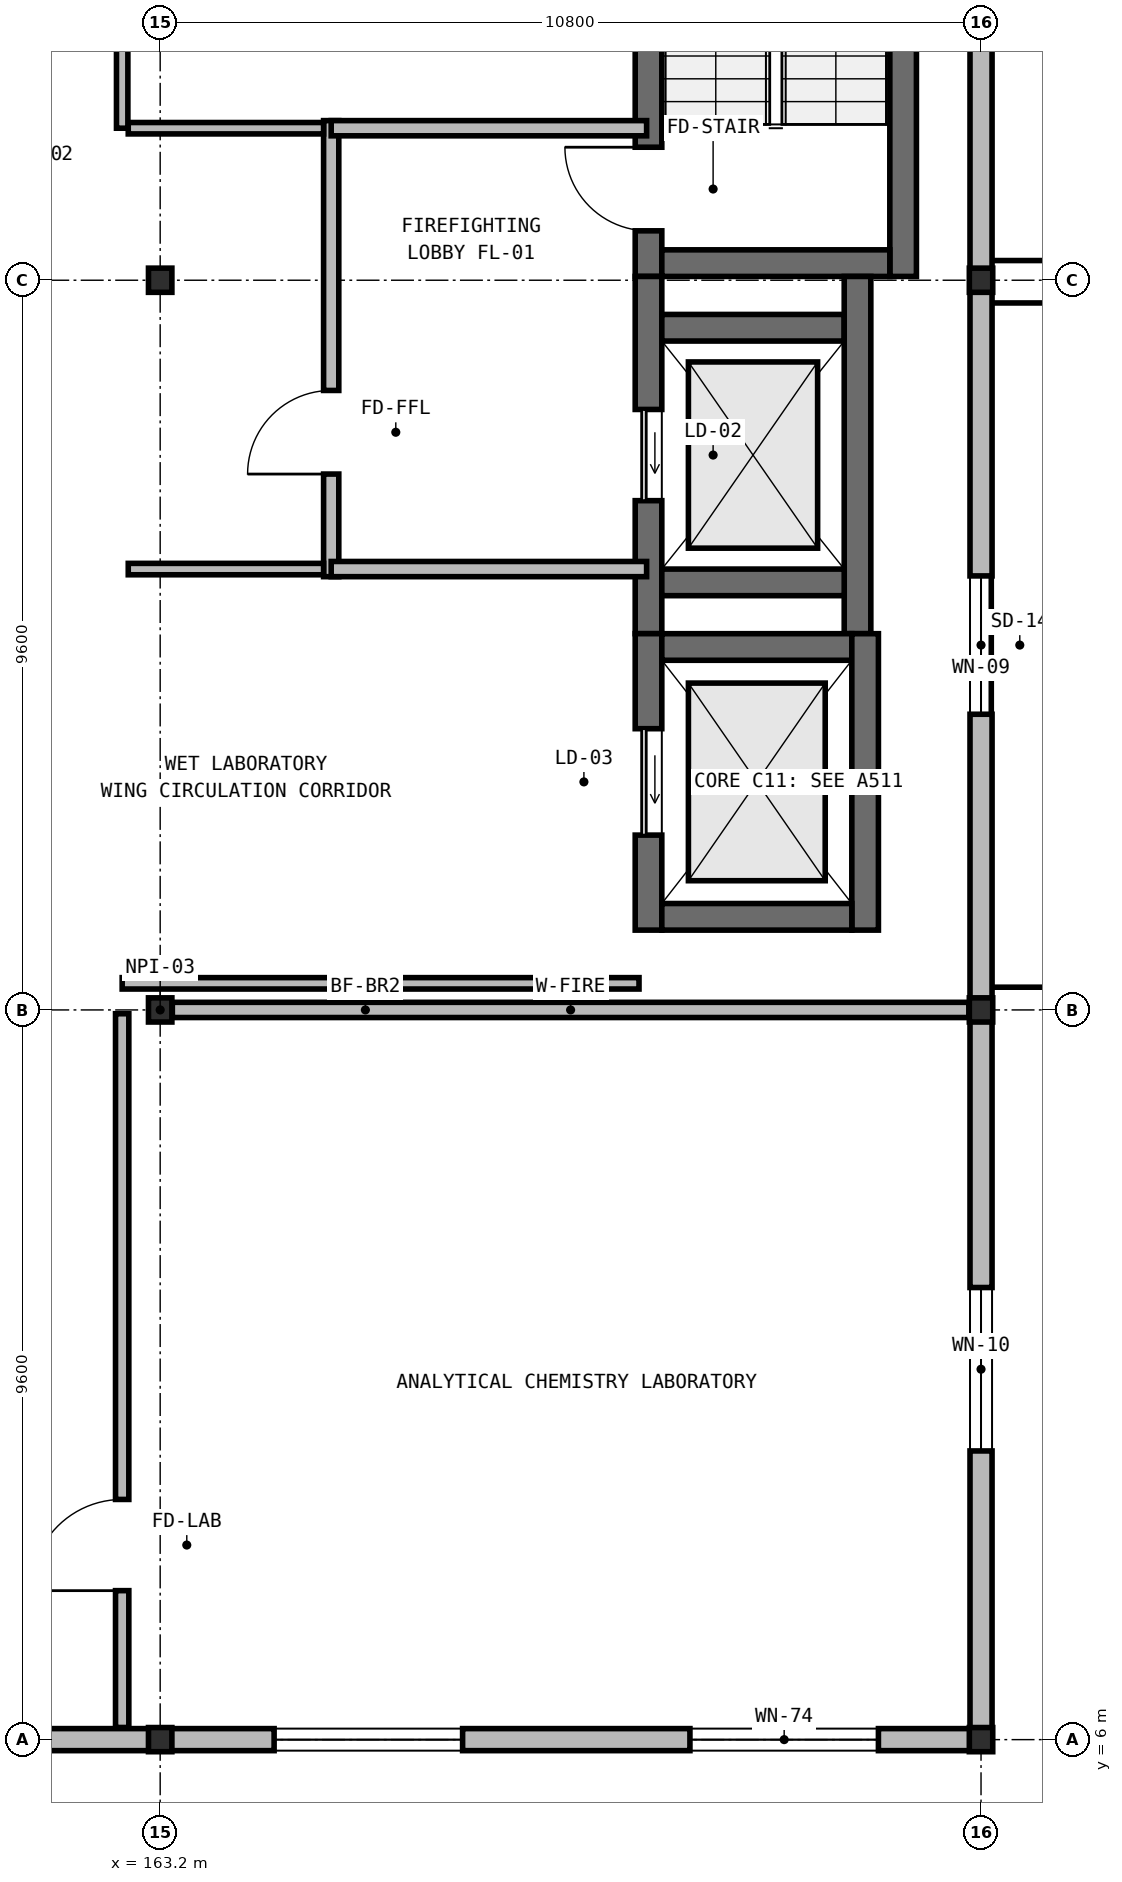
"""IFC4 building model, lengths in metres.
Left out: names, types, materials, properties, quantities, classifications, styles, units other than length and angle.
Written with IfcOpenShell. Run it as: python <this file> out.ifc"""

import sys

from ifc_helpers import new_model, si_unit, direction, frame, frame_2d, origin, origin_2d, place, context, subcontext, project, spatial, rectangle, i_section, extrude, element, fill, save


model = new_model("IFC4")
c1 = context("Model", 3, precision=1e-05, world=origin(), true_north=direction((0.0, 1.0)))
c2 = subcontext(c1, "Body", "Model", "MODEL_VIEW")
j1 = project(units=[si_unit("LENGTHUNIT", "METRE"), si_unit("PLANEANGLEUNIT", "RADIAN")], contexts=[c1])
p1 = place(None, origin())
s1 = spatial("IfcSite", under=j1, at=p1, CompositionType="ELEMENT")
p2 = place(p1, origin())
s2 = spatial("IfcBuilding", under=s1, at=p2, CompositionType="ELEMENT")
p3 = place(p2, frame((0.0, 0.0, 41.65)))
s3 = spatial("IfcBuildingStorey", under=s2, at=p3, CompositionType="ELEMENT", Elevation=41.65)
p4 = place(p3, frame((169.625, 25.25, 0.0), z_axis=(0.0, 0.0, 1.0), x_axis=(0.0, 1.0, 0.0)))
e1 = element("IfcWall", 1, at=p4, inside=s3, PredefinedType="SHEAR", context=c2, shape_type="SweptSolid", body=[
    extrude(rectangle(XDim=8.2, YDim=0.35, at=frame_2d((4.1, 0.0))), origin(), (0.0, 0.0, 1.0), 4.55),
])
p5 = place(p4, frame((0.6, 0.0, 0.0)))
e2 = element("IfcOpeningElement", 2, at=p5, cuts=e1, PredefinedType="OPENING", context=c2, shape_type="SweptSolid", body=[
    extrude(rectangle(XDim=1.1, YDim=2.15, at=frame_2d((0.55, 1.075))), frame((0.0, 0.185, 0.0), z_axis=(0.0, -1.0, 0.0), x_axis=(1.0, 0.0, 0.0)), (0.0, 0.0, 1.0), 0.37),
])
p6 = place(p3, frame((172.975, 33.45, 0.0), z_axis=(0.0, 0.0, 1.0), x_axis=(0.0, -1.0, 0.0)))
e3 = element("IfcWall", 3, at=p6, inside=s3, PredefinedType="SHEAR", context=c2, shape_type="SweptSolid", body=[
    extrude(rectangle(XDim=8.2, YDim=0.35, at=frame_2d((4.1, 0.0))), origin(), (0.0, 0.0, 1.0), 4.55),
])
p7 = place(p3, frame((172.8, 25.425, 0.0), z_axis=(0.0, 0.0, 1.0), x_axis=(-1.0, 0.0, 0.0)))
e4 = element("IfcWall", 4, at=p7, inside=s3, PredefinedType="SHEAR", context=c2, shape_type="SweptSolid", body=[
    extrude(rectangle(XDim=3.0, YDim=0.35, at=frame_2d((1.5, 0.0))), origin(), (0.0, 0.0, 1.0), 4.55),
])
p8 = place(p3, frame((169.625, 20.55, 0.0), z_axis=(0.0, 0.0, 1.0), x_axis=(0.0, 1.0, 0.0)))
e5 = element("IfcWall", 5, at=p8, inside=s3, PredefinedType="SHEAR", context=c2, shape_type="SweptSolid", body=[
    extrude(rectangle(XDim=4.7, YDim=0.35, at=frame_2d((2.35, 0.0))), origin(), (0.0, 0.0, 1.0), 4.55),
])
p9 = place(p8, frame((1.75, 0.0, 0.0)))
e6 = element("IfcOpeningElement", 6, at=p9, cuts=e5, PredefinedType="OPENING", context=c2, shape_type="SweptSolid", body=[
    extrude(rectangle(XDim=1.2, YDim=2.15, at=frame_2d((0.6, 1.075))), frame((0.0, 0.185, 0.0), z_axis=(0.0, -1.0, 0.0), x_axis=(1.0, 0.0, 0.0)), (0.0, 0.0, 1.0), 0.37),
])
p10 = place(p3, frame((169.8, 24.575, 0.0), z_axis=(0.0, 0.0, 1.0), x_axis=(1.0, 0.0, 0.0)))
e7 = element("IfcWall", 7, at=p10, inside=s3, PredefinedType="SHEAR", context=c2, shape_type="SweptSolid", body=[
    extrude(rectangle(XDim=2.4, YDim=0.35, at=frame_2d((1.2, 0.0))), origin(), (0.0, 0.0, 1.0), 4.55),
])
p11 = place(p3, frame((172.375, 25.25, 0.0), z_axis=(0.0, 0.0, 1.0), x_axis=(0.0, -1.0, 0.0)))
e8 = element("IfcWall", 8, at=p11, inside=s3, PredefinedType="SHEAR", context=c2, shape_type="SweptSolid", body=[
    extrude(rectangle(XDim=4.7, YDim=0.35, at=frame_2d((2.35, 0.0))), origin(), (0.0, 0.0, 1.0), 4.55),
])
p12 = place(p3, frame((172.2, 21.225, 0.0), z_axis=(0.0, 0.0, 1.0), x_axis=(-1.0, 0.0, 0.0)))
e9 = element("IfcWall", 9, at=p12, inside=s3, PredefinedType="SHEAR", context=c2, shape_type="SweptSolid", body=[
    extrude(rectangle(XDim=2.4, YDim=0.35, at=frame_2d((1.2, 0.0))), origin(), (0.0, 0.0, 1.0), 4.55),
])
p13 = place(p3, frame((169.625, 16.65, 0.0), z_axis=(0.0, 0.0, 1.0), x_axis=(0.0, 1.0, 0.0)))
e10 = element("IfcWall", 10, at=p13, inside=s3, PredefinedType="SHEAR", context=c2, shape_type="SweptSolid", body=[
    extrude(rectangle(XDim=3.9, YDim=0.35, at=frame_2d((1.95, 0.0))), origin(), (0.0, 0.0, 1.0), 4.55),
])
p14 = place(p13, frame((1.25, 0.0, 0.0)))
e11 = element("IfcOpeningElement", 11, at=p14, cuts=e10, PredefinedType="OPENING", context=c2, shape_type="SweptSolid", body=[
    extrude(rectangle(XDim=1.4, YDim=2.3, at=frame_2d((0.7, 1.15))), frame((0.0, 0.185, 0.0), z_axis=(0.0, -1.0, 0.0), x_axis=(1.0, 0.0, 0.0)), (0.0, 0.0, 1.0), 0.37),
])
p15 = place(p3, frame((169.8, 20.375, 0.0), z_axis=(0.0, 0.0, 1.0), x_axis=(1.0, 0.0, 0.0)))
e12 = element("IfcWall", 12, at=p15, inside=s3, PredefinedType="SHEAR", context=c2, shape_type="SweptSolid", body=[
    extrude(rectangle(XDim=2.5, YDim=0.35, at=frame_2d((1.25, 0.0))), origin(), (0.0, 0.0, 1.0), 4.55),
])
p16 = place(p3, frame((172.475, 20.55, 0.0), z_axis=(0.0, 0.0, 1.0), x_axis=(0.0, -1.0, 0.0)))
e13 = element("IfcWall", 13, at=p16, inside=s3, PredefinedType="SHEAR", context=c2, shape_type="SweptSolid", body=[
    extrude(rectangle(XDim=3.9, YDim=0.35, at=frame_2d((1.95, 0.0))), origin(), (0.0, 0.0, 1.0), 4.55),
])
p17 = place(p3, frame((172.3, 16.825, 0.0), z_axis=(0.0, 0.0, 1.0), x_axis=(-1.0, 0.0, 0.0)))
e14 = element("IfcWall", 14, at=p17, inside=s3, PredefinedType="SHEAR", context=c2, shape_type="SweptSolid", body=[
    extrude(rectangle(XDim=2.5, YDim=0.35, at=frame_2d((1.25, 0.0))), origin(), (0.0, 0.0, 1.0), 4.55),
])
for number, where, z_axis, x_axis in (
    (15, (163.2, 6.0, 0.0), (0.0, 0.0, 1.0), (1.0, 0.0, 0.0)),
    (16, (163.2, 15.6, 0.0), (0.0, 0.0, 1.0), (1.0, 0.0, 0.0)),
    (17, (163.2, 25.2, 0.0), (0.0, 0.0, 1.0), (1.0, 0.0, 0.0)),
    (18, (174.0, 6.0, 0.0), (0.0, 0.0, 1.0), (1.0, 0.0, 0.0)),
    (19, (174.0, 15.6, 0.0), (0.0, 0.0, 1.0), (1.0, 0.0, 0.0)),
    (20, (174.0, 25.2, 0.0), (0.0, 0.0, 1.0), (1.0, 0.0, 0.0)),
):
    element("IfcColumn", number, at=place(p3, frame(where, z_axis=z_axis, x_axis=x_axis)), inside=s3, PredefinedType="COLUMN", context=c2, shape_type="SweptSolid", body=[
        extrude(i_section(OverallWidth=0.308, OverallDepth=0.318, WebThickness=0.013, FlangeThickness=0.021, at=origin_2d()), origin(), (0.0, 0.0, 1.0), 4.55),
    ])
p18 = place(p3, frame((174.0, 34.796, 0.0), z_axis=(0.0, 0.0, 1.0), x_axis=(0.0, -1.0, 0.0)))
e21 = element("IfcWall", 21, at=p18, inside=s3, PredefinedType="SOLIDWALL", context=c2, shape_type="SweptSolid", body=[
    extrude(rectangle(XDim=9.592, YDim=0.29, at=frame_2d((4.796, 0.0))), origin(), (0.0, 0.0, 1.0), 3.822),
])
p19 = place(p18, frame((4.051, 0.0, 0.95)))
e22 = element("IfcOpeningElement", 22, at=p19, cuts=e21, PredefinedType="OPENING", context=c2, shape_type="SweptSolid", body=[
    extrude(rectangle(XDim=1.49, YDim=1.48, at=frame_2d((0.745, 0.74))), frame((0.0, 0.155, 0.0), z_axis=(0.0, -1.0, 0.0), x_axis=(1.0, 0.0, 0.0)), (0.0, 0.0, 1.0), 0.31),
])
p20 = place(p3, frame((174.0, 25.196, 0.0), z_axis=(0.0, 0.0, 1.0), x_axis=(0.0, -1.0, 0.0)))
e23 = element("IfcWall", 23, at=p20, inside=s3, PredefinedType="SOLIDWALL", context=c2, shape_type="SweptSolid", body=[
    extrude(rectangle(XDim=9.592, YDim=0.29, at=frame_2d((4.796, 0.0))), origin(), (0.0, 0.0, 1.0), 3.822),
])
p21 = place(p20, frame((3.886, 0.0, 0.95)))
e24 = element("IfcOpeningElement", 24, at=p21, cuts=e23, PredefinedType="OPENING", context=c2, shape_type="SweptSolid", body=[
    extrude(rectangle(XDim=1.82, YDim=1.4, at=frame_2d((0.91, 0.7))), frame((0.0, 0.155, 0.0), z_axis=(0.0, -1.0, 0.0), x_axis=(1.0, 0.0, 0.0)), (0.0, 0.0, 1.0), 0.31),
])
p22 = place(p3, frame((174.0, 15.596, 0.0), z_axis=(0.0, 0.0, 1.0), x_axis=(0.0, -1.0, 0.0)))
e25 = element("IfcWall", 25, at=p22, inside=s3, PredefinedType="SOLIDWALL", context=c2, shape_type="SweptSolid", body=[
    extrude(rectangle(XDim=9.447, YDim=0.29, at=frame_2d((4.724, 0.0))), origin(), (0.0, 0.0, 1.0), 3.864),
])
p23 = place(p22, frame((3.648, 0.0, 0.95)))
e26 = element("IfcOpeningElement", 26, at=p23, cuts=e25, PredefinedType="OPENING", context=c2, shape_type="SweptSolid", body=[
    extrude(rectangle(XDim=2.15, YDim=1.8, at=frame_2d((1.075, 0.9))), frame((0.0, 0.155, 0.0), z_axis=(0.0, -1.0, 0.0), x_axis=(1.0, 0.0, 0.0)), (0.0, 0.0, 1.0), 0.31),
])
p24 = place(p3, frame((174.145, 6.0, 0.0), z_axis=(0.0, 0.0, 1.0), x_axis=(-1.0, 0.0, 0.0)))
e27 = element("IfcWall", 27, at=p24, inside=s3, PredefinedType="SOLIDWALL", context=c2, shape_type="SweptSolid", body=[
    extrude(rectangle(XDim=10.941, YDim=0.29, at=frame_2d((5.47, 0.0))), origin(), (0.0, 0.0, 1.0), 3.795),
])
p25 = place(p24, frame((1.495, 0.0, 0.95)))
e28 = element("IfcOpeningElement", 28, at=p25, cuts=e27, PredefinedType="OPENING", context=c2, shape_type="SweptSolid", body=[
    extrude(rectangle(XDim=2.48, YDim=1.72, at=frame_2d((1.24, 0.86))), frame((0.0, 0.155, 0.0), z_axis=(0.0, -1.0, 0.0), x_axis=(1.0, 0.0, 0.0)), (0.0, 0.0, 1.0), 0.31),
])
p26 = place(p24, frame((6.966, 0.0, 0.95)))
e29 = element("IfcOpeningElement", 29, at=p26, cuts=e27, PredefinedType="OPENING", context=c2, shape_type="SweptSolid", body=[
    extrude(rectangle(XDim=2.48, YDim=1.72, at=frame_2d((1.24, 0.86))), frame((0.0, 0.155, 0.0), z_axis=(0.0, -1.0, 0.0), x_axis=(1.0, 0.0, 0.0)), (0.0, 0.0, 1.0), 0.31),
])
p27 = place(p3, frame((163.196, 6.0, 0.0), z_axis=(0.0, 0.0, 1.0), x_axis=(-1.0, 0.0, 0.0)))
e30 = element("IfcWall", 30, at=p27, inside=s3, PredefinedType="SOLIDWALL", context=c2, shape_type="SweptSolid", body=[
    extrude(rectangle(XDim=9.741, YDim=0.29, at=frame_2d((4.871, 0.0))), origin(), (0.0, 0.0, 1.0), 3.864),
])
p28 = place(p27, frame((6.616, 0.0, 0.95)))
e31 = element("IfcOpeningElement", 31, at=p28, cuts=e30, PredefinedType="OPENING", context=c2, shape_type="SweptSolid", body=[
    extrude(rectangle(XDim=1.38, YDim=1.56, at=frame_2d((0.69, 0.78))), frame((0.0, 0.155, 0.0), z_axis=(0.0, -1.0, 0.0), x_axis=(1.0, 0.0, 0.0)), (0.0, 0.0, 1.0), 0.31),
])
p29 = place(p3, frame((163.36, 15.6, 0.0), z_axis=(0.0, 0.0, 1.0), x_axis=(1.0, 0.0, 0.0)))
e32 = element("IfcWall", 32, at=p29, inside=s3, PredefinedType="SOLIDWALL", context=c2, shape_type="SweptSolid", body=[
    extrude(rectangle(XDim=10.48, YDim=0.2, at=frame_2d((5.24, 0.0))), origin(), (0.0, 0.0, 1.0), 3.675),
])
p30 = place(p3, frame((165.45, 21.3, 0.0), z_axis=(0.0, 0.0, 1.0), x_axis=(0.0, 1.0, 0.0)))
e33 = element("IfcWall", 33, at=p30, inside=s3, PredefinedType="SOLIDWALL", context=c2, shape_type="SweptSolid", body=[
    extrude(rectangle(XDim=6.0, YDim=0.2, at=frame_2d((3.0, 0.0))), origin(), (0.0, 0.0, 1.0), 4.3),
])
p31 = place(p30, frame((1.35, 0.0, 0.0)))
e34 = element("IfcOpeningElement", 34, at=p31, cuts=e33, PredefinedType="OPENING", context=c2, shape_type="SweptSolid", body=[
    extrude(rectangle(XDim=1.1, YDim=2.15, at=frame_2d((0.55, 1.075))), frame((0.0, 0.11, 0.0), z_axis=(0.0, -1.0, 0.0), x_axis=(1.0, 0.0, 0.0)), (0.0, 0.0, 1.0), 0.22),
])
for number, where, z_axis, x_axis in (
    (35, (165.45, 21.4, 0.0), (0.0, 0.0, 1.0), (1.0, 0.0, 0.0)),
    (36, (165.45, 27.2, 0.0), (0.0, 0.0, 1.0), (1.0, 0.0, 0.0)),
):
    element("IfcWall", number, at=place(p3, frame(where, z_axis=z_axis, x_axis=x_axis)), inside=s3, PredefinedType="SOLIDWALL", context=c2, shape_type="SweptSolid", body=[
        extrude(rectangle(XDim=4.15, YDim=0.2, at=frame_2d((2.075, 0.0))), origin(), (0.0, 0.0, 1.0), 4.3),
    ])
p32 = place(p3, frame((162.78, 27.2, 0.0), z_axis=(0.0, 0.0, 1.0), x_axis=(1.0, 0.0, 0.0)))
e37 = element("IfcWall", 37, at=p32, inside=s3, PredefinedType="PARTITIONING", context=c2, shape_type="SweptSolid", body=[
    extrude(rectangle(XDim=2.57, YDim=0.15, at=frame_2d((1.285, 0.0))), origin(), (0.0, 0.0, 1.0), 4.3),
])
p33 = place(p3, frame((162.7, 27.2, 0.0), z_axis=(0.0, 0.0, 1.0), x_axis=(0.0, 1.0, 0.0)))
e38 = element("IfcWall", 38, at=p33, inside=s3, PredefinedType="PARTITIONING", context=c2, shape_type="SweptSolid", body=[
    extrude(rectangle(XDim=8.92, YDim=0.15, at=frame_2d((4.46, 0.0))), origin(), (0.0, 0.0, 1.0), 4.3),
])
p34 = place(p33, frame((2.6, 0.0, 0.0)))
e39 = element("IfcOpeningElement", 39, at=p34, cuts=e38, PredefinedType="OPENING", context=c2, shape_type="SweptSolid", body=[
    extrude(rectangle(XDim=1.1, YDim=2.2, at=frame_2d((0.55, 1.1))), frame((0.0, 0.085, 0.0), z_axis=(0.0, -1.0, 0.0), x_axis=(1.0, 0.0, 0.0)), (0.0, 0.0, 1.0), 0.17),
])
p35 = place(p3, frame((162.7, 6.16, 0.0), z_axis=(0.0, 0.0, 1.0), x_axis=(0.0, 1.0, 0.0)))
e40 = element("IfcWall", 40, at=p35, inside=s3, PredefinedType="PARTITIONING", context=c2, shape_type="SweptSolid", body=[
    extrude(rectangle(XDim=9.39, YDim=0.175, at=frame_2d((4.695, 0.0))), origin(), (0.0, 0.0, 1.0), 4.3),
])
p36 = place(p35, frame((1.8, 0.0, 0.0)))
e41 = element("IfcOpeningElement", 41, at=p36, cuts=e40, PredefinedType="OPENING", context=c2, shape_type="SweptSolid", body=[
    extrude(rectangle(XDim=1.2, YDim=2.2, at=frame_2d((0.6, 1.1))), frame((0.0, 0.097, 0.0), z_axis=(0.0, -1.0, 0.0), x_axis=(1.0, 0.0, 0.0)), (0.0, 0.0, 1.0), 0.195),
])
p37 = place(p3, frame((162.78, 21.4, 0.0), z_axis=(0.0, 0.0, 1.0), x_axis=(1.0, 0.0, 0.0)))
e42 = element("IfcWall", 42, at=p37, inside=s3, PredefinedType="PARTITIONING", context=c2, shape_type="SweptSolid", body=[
    extrude(rectangle(XDim=2.57, YDim=0.15, at=frame_2d((1.285, 0.0))), origin(), (0.0, 0.0, 1.0), 4.3),
])
p38 = place(p3, frame((162.7, 15.95, 0.0), z_axis=(0.0, 0.0, 1.0), x_axis=(1.0, 0.0, 0.0)))
e43 = element("IfcWall", 43, at=p38, inside=s3, PredefinedType="PARTITIONING", context=c2, shape_type="SweptSolid", body=[
    extrude(rectangle(XDim=6.8, YDim=0.15, at=frame_2d((3.4, 0.0))), origin(), (0.0, 0.0, 1.0), 4.3),
])
p39 = place(p21, origin())
e44 = element("IfcWindow", 44, at=p39, inside=s3, PartitioningType="SINGLE_PANEL", PredefinedType="WINDOW", context=c2, shape_type="SweptSolid", body=[
    extrude(rectangle(XDim=1.82, YDim=1.4, at=frame_2d((0.91, 0.7))), frame((0.0, 0.03, 0.0), z_axis=(0.0, -1.0, 0.0), x_axis=(1.0, 0.0, 0.0)), (0.0, 0.0, 1.0), 0.06),
])
fill(e24, e44)
p40 = place(p23, origin())
e45 = element("IfcWindow", 45, at=p40, inside=s3, PartitioningType="SINGLE_PANEL", PredefinedType="WINDOW", context=c2, shape_type="SweptSolid", body=[
    extrude(rectangle(XDim=2.15, YDim=1.8, at=frame_2d((1.075, 0.9))), frame((0.0, 0.03, 0.0), z_axis=(0.0, -1.0, 0.0), x_axis=(1.0, 0.0, 0.0)), (0.0, 0.0, 1.0), 0.06),
])
fill(e26, e45)
p41 = place(p25, origin())
e46 = element("IfcWindow", 46, at=p41, inside=s3, PartitioningType="SINGLE_PANEL", PredefinedType="WINDOW", context=c2, shape_type="SweptSolid", body=[
    extrude(rectangle(XDim=2.48, YDim=1.72, at=frame_2d((1.24, 0.86))), frame((0.0, 0.03, 0.0), z_axis=(0.0, -1.0, 0.0), x_axis=(1.0, 0.0, 0.0)), (0.0, 0.0, 1.0), 0.06),
])
fill(e28, e46)
p42 = place(p26, origin())
e47 = element("IfcWindow", 47, at=p42, inside=s3, PartitioningType="SINGLE_PANEL", PredefinedType="WINDOW", context=c2, shape_type="SweptSolid", body=[
    extrude(rectangle(XDim=2.48, YDim=1.72, at=frame_2d((1.24, 0.86))), frame((0.0, 0.03, 0.0), z_axis=(0.0, -1.0, 0.0), x_axis=(1.0, 0.0, 0.0)), (0.0, 0.0, 1.0), 0.06),
])
fill(e29, e47)
p43 = place(p5, origin())
e48 = element("IfcDoor", 48, at=p43, inside=s3, OperationType="SINGLE_SWING_RIGHT", PredefinedType="DOOR", context=c2, shape_type="SweptSolid", body=[
    extrude(rectangle(XDim=1.1, YDim=2.15, at=frame_2d((0.55, 1.075))), frame((0.0, 0.025, 0.0), z_axis=(0.0, -1.0, 0.0), x_axis=(1.0, 0.0, 0.0)), (0.0, 0.0, 1.0), 0.05),
])
fill(e2, e48)
p44 = place(p9, origin())
e49 = element("IfcDoor", 49, at=p44, inside=s3, OperationType="SLIDING_TO_LEFT", PredefinedType="USERDEFINED", context=c2, shape_type="SweptSolid", body=[
    extrude(rectangle(XDim=1.2, YDim=2.15, at=frame_2d((0.6, 1.075))), frame((0.0, 0.025, 0.0), z_axis=(0.0, -1.0, 0.0), x_axis=(1.0, 0.0, 0.0)), (0.0, 0.0, 1.0), 0.05),
])
fill(e6, e49)
p45 = place(p14, origin())
e50 = element("IfcDoor", 50, at=p45, inside=s3, OperationType="SLIDING_TO_LEFT", PredefinedType="USERDEFINED", context=c2, shape_type="SweptSolid", body=[
    extrude(rectangle(XDim=1.4, YDim=2.3, at=frame_2d((0.7, 1.15))), frame((0.0, 0.025, 0.0), z_axis=(0.0, -1.0, 0.0), x_axis=(1.0, 0.0, 0.0)), (0.0, 0.0, 1.0), 0.05),
])
fill(e11, e50)
p46 = place(p31, origin())
e51 = element("IfcDoor", 51, at=p46, inside=s3, OperationType="SINGLE_SWING_LEFT", PredefinedType="DOOR", context=c2, shape_type="SweptSolid", body=[
    extrude(rectangle(XDim=1.1, YDim=2.15, at=frame_2d((0.55, 1.075))), frame((0.0, 0.025, 0.0), z_axis=(0.0, -1.0, 0.0), x_axis=(1.0, 0.0, 0.0)), (0.0, 0.0, 1.0), 0.05),
])
fill(e34, e51)
p47 = place(p36, origin())
e52 = element("IfcDoor", 52, at=p47, inside=s3, OperationType="SINGLE_SWING_LEFT", PredefinedType="DOOR", context=c2, shape_type="SweptSolid", body=[
    extrude(rectangle(XDim=1.2, YDim=2.2, at=frame_2d((0.6, 1.1))), frame((0.0, 0.025, 0.0), z_axis=(0.0, -1.0, 0.0), x_axis=(1.0, 0.0, 0.0)), (0.0, 0.0, 1.0), 0.05),
])
fill(e41, e52)
save(model, sys.argv[1])
